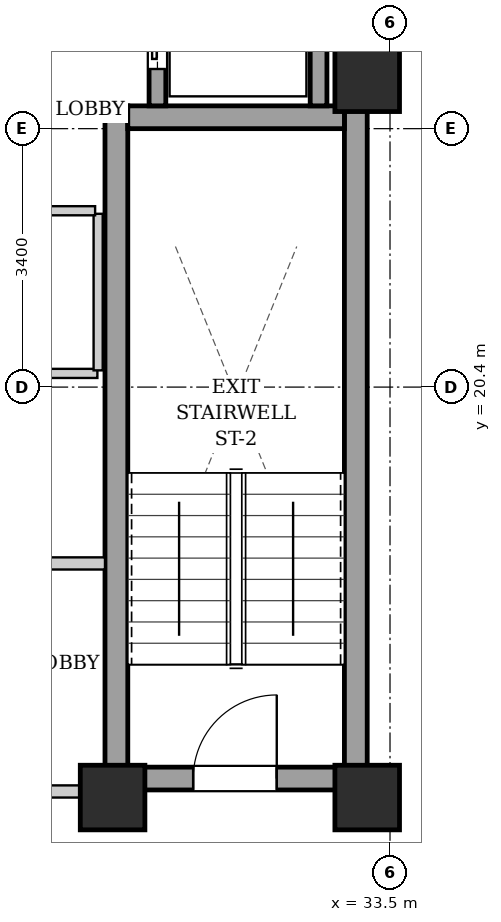
"""IFC4 building model, lengths in metres.
Left out: names, types, materials, properties, quantities, classifications, styles, units other than length and angle.
Written with IfcOpenShell. Run it as: python <this file> out.ifc"""

import sys

from ifc_helpers import new_model, si_unit, direction, frame, frame_2d, origin, origin_2d, place, context, subcontext, project, spatial, rectangle, extrude, element, fill, save


model = new_model("IFC4")
c1 = context("Model", 3, precision=1e-05, world=origin(), true_north=direction((0.0, 1.0)))
c2 = subcontext(c1, "Body", "Model", "MODEL_VIEW")
j1 = project(units=[si_unit("LENGTHUNIT", "METRE"), si_unit("PLANEANGLEUNIT", "RADIAN")], contexts=[c1])
p1 = place(None, origin())
s1 = spatial("IfcSite", under=j1, at=p1, CompositionType="ELEMENT")
p2 = place(p1, origin())
s2 = spatial("IfcBuilding", under=s1, at=p2, CompositionType="ELEMENT")
p3 = place(p2, frame((0.0, 0.0, 204.1)))
s3 = spatial("IfcBuildingStorey", under=s2, at=p3, CompositionType="ELEMENT", Elevation=204.1)
for number, where, z_axis, x_axis in (
    (1, (29.85, 15.0, 0.0), (0.0, 0.0, 1.0), (1.0, 0.0, 0.0)),
    (2, (33.2, 15.0, 0.0), (0.0, 0.0, 1.0), (1.0, 0.0, 0.0)),
    (3, (33.2, 24.45, 0.0), (0.0, 0.0, 1.0), (1.0, 0.0, 0.0)),
):
    element("IfcColumn", number, at=place(p3, frame(where, z_axis=z_axis, x_axis=x_axis)), inside=s3, PredefinedType="COLUMN", context=c2, shape_type="SweptSolid", body=[
        extrude(rectangle(XDim=0.85, YDim=0.85, at=origin_2d()), origin(), (0.0, 0.0, 1.0), 3.3),
    ])
for number, where, z_axis, x_axis in (
    (4, (29.9, 15.1, 0.0), (0.0, 0.0, 1.0), (0.0, 1.0, 0.0)),
    (5, (33.05, 15.1, 0.0), (0.0, 0.0, 1.0), (0.0, 1.0, 0.0)),
):
    element("IfcWall", number, at=place(p3, frame(where, z_axis=z_axis, x_axis=x_axis)), inside=s3, PredefinedType="SHEAR", context=c2, shape_type="SweptSolid", body=[
        extrude(rectangle(XDim=9.0, YDim=0.3, at=frame_2d((4.5, 0.0))), origin(), (0.0, 0.0, 1.0), 3.04),
    ])
p4 = place(p3, frame((30.05, 23.95, 0.0), z_axis=(0.0, 0.0, 1.0), x_axis=(1.0, 0.0, 0.0)))
e6 = element("IfcWall", 6, at=p4, inside=s3, PredefinedType="SHEAR", context=c2, shape_type="SweptSolid", body=[
    extrude(rectangle(XDim=2.85, YDim=0.3, at=frame_2d((1.425, 0.0))), origin(), (0.0, 0.0, 1.0), 3.04),
])
p5 = place(p3, frame((30.05, 15.25, 0.0), z_axis=(0.0, 0.0, 1.0), x_axis=(1.0, 0.0, 0.0)))
e7 = element("IfcWall", 7, at=p5, inside=s3, PredefinedType="SHEAR", context=c2, shape_type="SweptSolid", body=[
    extrude(rectangle(XDim=2.85, YDim=0.3, at=frame_2d((1.425, 0.0))), origin(), (0.0, 0.0, 1.0), 3.04),
])
p6 = place(p5, frame((0.86, 0.0, 0.0)))
e8 = element("IfcOpeningElement", 8, at=p6, cuts=e7, PredefinedType="OPENING", context=c2, shape_type="SweptSolid", body=[
    extrude(rectangle(XDim=1.1, YDim=2.05, at=frame_2d((0.55, 1.025))), frame((0.0, 0.16, 0.0), z_axis=(0.0, -1.0, 0.0), x_axis=(1.0, 0.0, 0.0)), (0.0, 0.0, 1.0), 0.32),
])
p7 = place(p3, frame((30.44, 24.1, 0.0), z_axis=(0.0, 0.0, 1.0), x_axis=(0.0, 1.0, 0.0)))
e9 = element("IfcWall", 9, at=p7, inside=s3, PredefinedType="SHEAR", context=c2, shape_type="SweptSolid", body=[
    extrude(rectangle(XDim=2.07, YDim=0.22, at=frame_2d((1.035, 0.0))), origin(), (0.0, 0.0, 1.0), 3.04),
])
p8 = place(p7, frame((0.485, 0.0, 0.0)))
e10 = element("IfcOpeningElement", 10, at=p8, cuts=e9, PredefinedType="OPENING", context=c2, shape_type="SweptSolid", body=[
    extrude(rectangle(XDim=1.1, YDim=2.15, at=frame_2d((0.55, 1.075))), frame((0.0, 0.12, 0.0), z_axis=(0.0, -1.0, 0.0), x_axis=(1.0, 0.0, 0.0)), (0.0, 0.0, 1.0), 0.24),
])
p9 = place(p3, frame((32.56, 24.1, 0.0), z_axis=(0.0, 0.0, 1.0), x_axis=(0.0, 1.0, 0.0)))
e11 = element("IfcWall", 11, at=p9, inside=s3, PredefinedType="SHEAR", context=c2, shape_type="SweptSolid", body=[
    extrude(rectangle(XDim=2.07, YDim=0.22, at=frame_2d((1.035, 0.0))), origin(), (0.0, 0.0, 1.0), 3.04),
])
p10 = place(p3, frame((21.25, 15.08, 0.0), z_axis=(0.0, 0.0, 1.0), x_axis=(1.0, 0.0, 0.0)))
e12 = element("IfcWall", 12, at=p10, inside=s3, PredefinedType="PARTITIONING", context=c2, shape_type="SweptSolid", body=[
    extrude(rectangle(XDim=8.5, YDim=0.16, at=frame_2d((4.25, 0.0))), origin(), (0.0, 0.0, 1.0), 2.556),
])
p11 = place(p10, frame((3.725, 0.0, 0.0)))
e13 = element("IfcOpeningElement", 13, at=p11, cuts=e12, PredefinedType="OPENING", context=c2, shape_type="SweptSolid", body=[
    extrude(rectangle(XDim=1.05, YDim=2.05, at=frame_2d((0.525, 1.025))), frame((0.0, 0.09, 0.0), z_axis=(0.0, -1.0, 0.0), x_axis=(1.0, 0.0, 0.0)), (0.0, 0.0, 1.0), 0.18),
])
p12 = place(p3, frame((28.65, 18.08, 0.0), z_axis=(0.0, 0.0, 1.0), x_axis=(1.0, 0.0, 0.0)))
e14 = element("IfcWall", 14, at=p12, inside=s3, PredefinedType="PARTITIONING", context=c2, shape_type="SweptSolid", body=[
    extrude(rectangle(XDim=1.1, YDim=0.16, at=frame_2d((0.55, 0.0))), origin(), (0.0, 0.0, 1.0), 3.04),
])
p13 = place(p3, frame((33.12, 24.12, 0.0), z_axis=(0.0, 0.0, 1.0), x_axis=(0.0, 1.0, 0.0)))
e15 = element("IfcWall", 15, at=p13, inside=s3, PredefinedType="PARTITIONING", context=c2, shape_type="SweptSolid", body=[
    extrude(rectangle(XDim=4.76, YDim=0.16, at=frame_2d((2.38, 0.0))), origin(), (0.0, 0.0, 1.0), 3.04),
])
p14 = place(p3, frame((22.3, 20.58, 0.0), z_axis=(0.0, 0.0, 1.0), x_axis=(1.0, 0.0, 0.0)))
e16 = element("IfcWall", 16, at=p14, inside=s3, PredefinedType="PARTITIONING", context=c2, shape_type="SweptSolid", body=[
    extrude(rectangle(XDim=7.35, YDim=0.12, at=frame_2d((3.675, 0.0))), origin(), (0.0, 0.0, 1.0), 3.04),
])
p15 = place(p3, frame((29.66, 20.62, 0.0), z_axis=(0.0, 0.0, 1.0), x_axis=(0.0, 1.0, 0.0)))
e17 = element("IfcWall", 17, at=p15, inside=s3, PredefinedType="PARTITIONING", context=c2, shape_type="SweptSolid", body=[
    extrude(rectangle(XDim=2.06, YDim=0.12, at=frame_2d((1.03, 0.0))), origin(), (0.0, 0.0, 1.0), 3.04),
])
p16 = place(p3, frame((22.35, 22.72, 0.0), z_axis=(0.0, 0.0, 1.0), x_axis=(1.0, 0.0, 0.0)))
e18 = element("IfcWall", 18, at=p16, inside=s3, PredefinedType="PARTITIONING", context=c2, shape_type="SweptSolid", body=[
    extrude(rectangle(XDim=7.27, YDim=0.12, at=frame_2d((3.635, 0.0))), origin(), (0.0, 0.0, 1.0), 3.04),
])
p17 = place(p16, frame((3.25, 0.0, 0.0)))
e19 = element("IfcOpeningElement", 19, at=p17, cuts=e18, PredefinedType="OPENING", context=c2, shape_type="SweptSolid", body=[
    extrude(rectangle(XDim=0.9, YDim=2.05, at=frame_2d((0.45, 1.025))), frame((0.0, 0.07, 0.0), z_axis=(0.0, -1.0, 0.0), x_axis=(1.0, 0.0, 0.0)), (0.0, 0.0, 1.0), 0.14),
])
p18 = place(p6, origin())
e20 = element("IfcDoor", 20, at=p18, inside=s3, OperationType="SINGLE_SWING_RIGHT", PredefinedType="DOOR", context=c2, shape_type="SweptSolid", body=[
    extrude(rectangle(XDim=1.1, YDim=2.05, at=frame_2d((0.55, 1.025))), frame((0.0, 0.025, 0.0), z_axis=(0.0, -1.0, 0.0), x_axis=(1.0, 0.0, 0.0)), (0.0, 0.0, 1.0), 0.05),
])
fill(e8, e20)
p19 = place(p8, origin())
e21 = element("IfcDoor", 21, at=p19, inside=s3, OperationType="SLIDING_TO_LEFT", PredefinedType="DOOR", context=c2, shape_type="SweptSolid", body=[
    extrude(rectangle(XDim=1.1, YDim=2.15, at=frame_2d((0.55, 1.075))), frame((0.0, 0.025, 0.0), z_axis=(0.0, -1.0, 0.0), x_axis=(1.0, 0.0, 0.0)), (0.0, 0.0, 1.0), 0.05),
])
fill(e10, e21)
save(model, sys.argv[1])
